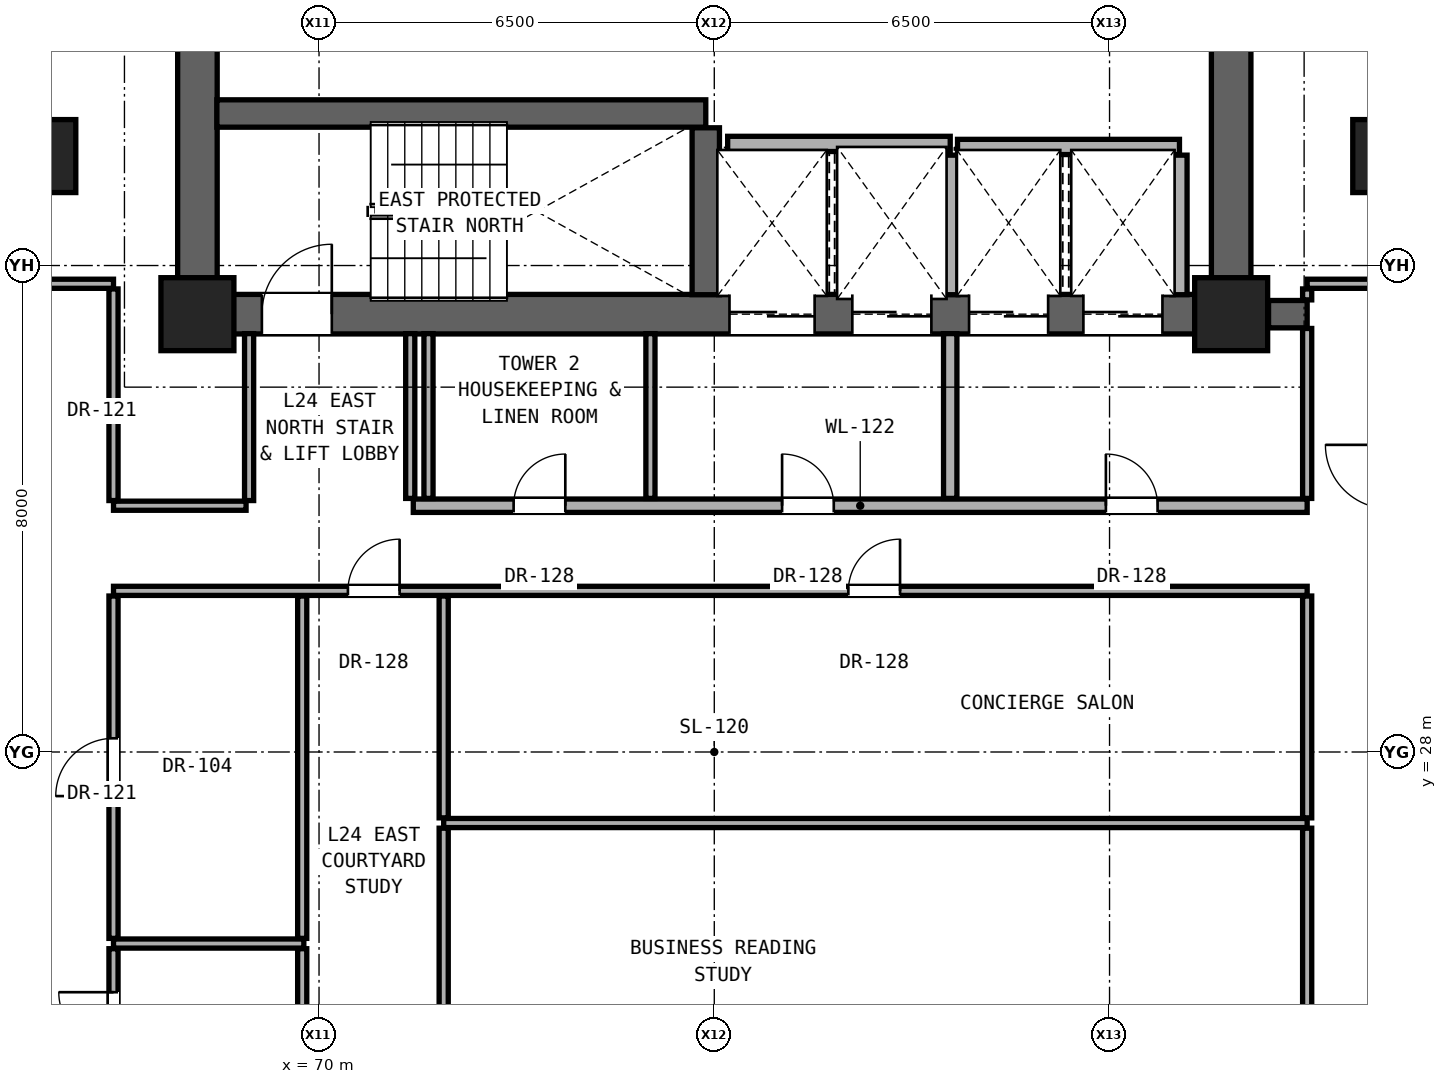
"""IFC4 building model, lengths in metres.
Left out: names, types, materials, properties, quantities, classifications, styles, units other than length and angle.
Written with IfcOpenShell. Run it as: python <this file> out.ifc"""

import sys

from ifc_helpers import new_model, si_unit, direction, frame, frame_2d, origin, origin_2d, place, context, subcontext, project, spatial, rectangle, extrude, element, fill, save


model = new_model("IFC4")
c1 = context("Model", 3, precision=1e-05, world=origin(), true_north=direction((0.0, 1.0)))
c2 = subcontext(c1, "Body", "Model", "MODEL_VIEW")
j1 = project(units=[si_unit("LENGTHUNIT", "METRE"), si_unit("PLANEANGLEUNIT", "RADIAN")], contexts=[c1])
p1 = place(None, origin())
s1 = spatial("IfcSite", under=j1, at=p1, CompositionType="ELEMENT")
p2 = place(p1, origin())
s2 = spatial("IfcBuilding", under=s1, at=p2, CompositionType="ELEMENT")
p3 = place(p2, frame((0.0, 0.0, 88.4)))
s3 = spatial("IfcBuildingStorey", under=s2, at=p3, CompositionType="ELEMENT", Elevation=88.4)
for number, where, z_axis, x_axis in (
    (1, (68.0, 35.2, 0.0), (0.0, 0.0, 1.0), (1.0, 0.0, 0.0)),
    (2, (85.0, 35.2, 0.0), (0.0, 0.0, 1.0), (1.0, 0.0, 0.0)),
):
    element("IfcColumn", number, at=place(p3, frame(where, z_axis=z_axis, x_axis=x_axis)), inside=s3, PredefinedType="COLUMN", context=c2, shape_type="SweptSolid", body=[
        extrude(rectangle(XDim=1.2, YDim=1.2, at=origin_2d()), origin(), (0.0, 0.0, 1.0), 3.3),
    ])
for number, where, z_axis, x_axis in (
    (3, (65.6, 37.8, 0.0), (0.0, 0.0, 1.0), (1.0, 0.0, 0.0)),
    (4, (87.4, 37.8, 0.0), (0.0, 0.0, 1.0), (1.0, 0.0, 0.0)),
):
    element("IfcColumn", number, at=place(p3, frame(where, z_axis=z_axis, x_axis=x_axis)), inside=s3, PredefinedType="PILASTER", context=c2, shape_type="SweptSolid", body=[
        extrude(rectangle(XDim=0.8, YDim=1.2, at=origin_2d()), origin(), (0.0, 0.0, 1.0), 3.3),
    ])
for number, where, z_axis, x_axis in (
    (5, (68.0, 35.2, 0.0), (0.0, 0.0, 1.0), (0.0, 1.0, 0.0)),
    (6, (85.0, 35.2, 0.0), (0.0, 0.0, 1.0), (0.0, 1.0, 0.0)),
):
    element("IfcWall", number, at=place(p3, frame(where, z_axis=z_axis, x_axis=x_axis)), inside=s3, PredefinedType="SHEAR", context=c2, shape_type="SweptSolid", body=[
        extrude(rectangle(XDim=5.6, YDim=0.65, at=frame_2d((2.8, 0.0))), origin(), (0.0, 0.0, 1.0), 3.08),
    ])
p4 = place(p3, frame((68.0, 35.2, 0.0), z_axis=(0.0, 0.0, 1.0), x_axis=(1.0, 0.0, 0.0)))
e7 = element("IfcWall", 7, at=p4, inside=s3, PredefinedType="SHEAR", context=c2, shape_type="SweptSolid", body=[
    extrude(rectangle(XDim=17.0, YDim=0.65, at=frame_2d((8.5, 0.0))), origin(), (0.0, 0.0, 1.0), 3.08),
])
p5 = place(p4, frame((1.06, 0.0, 0.0)))
e8 = element("IfcOpeningElement", 8, at=p5, cuts=e7, PredefinedType="OPENING", context=c2, shape_type="SweptSolid", body=[
    extrude(rectangle(XDim=1.15, YDim=2.2, at=frame_2d((0.575, 1.1))), frame((0.0, 0.335, 0.0), z_axis=(0.0, -1.0, 0.0), x_axis=(1.0, 0.0, 0.0)), (0.0, 0.0, 1.0), 0.67),
])
p6 = place(p4, frame((8.75, 0.0, 0.0)))
e9 = element("IfcOpeningElement", 9, at=p6, cuts=e7, PredefinedType="OPENING", context=c2, shape_type="SweptSolid", body=[
    extrude(rectangle(XDim=1.4, YDim=2.35, at=frame_2d((0.7, 1.175))), frame((0.0, 0.335, 0.0), z_axis=(0.0, -1.0, 0.0), x_axis=(1.0, 0.0, 0.0)), (0.0, 0.0, 1.0), 0.67),
])
p7 = place(p4, frame((10.77, 0.0, 0.0)))
e10 = element("IfcOpeningElement", 10, at=p7, cuts=e7, PredefinedType="OPENING", context=c2, shape_type="SweptSolid", body=[
    extrude(rectangle(XDim=1.3, YDim=2.3, at=frame_2d((0.65, 1.15))), frame((0.0, 0.335, 0.0), z_axis=(0.0, -1.0, 0.0), x_axis=(1.0, 0.0, 0.0)), (0.0, 0.0, 1.0), 0.67),
])
p8 = place(p4, frame((12.69, 0.0, 0.0)))
e11 = element("IfcOpeningElement", 11, at=p8, cuts=e7, PredefinedType="OPENING", context=c2, shape_type="SweptSolid", body=[
    extrude(rectangle(XDim=1.3, YDim=2.3, at=frame_2d((0.65, 1.15))), frame((0.0, 0.335, 0.0), z_axis=(0.0, -1.0, 0.0), x_axis=(1.0, 0.0, 0.0)), (0.0, 0.0, 1.0), 0.67),
])
p9 = place(p4, frame((14.57, 0.0, 0.0)))
e12 = element("IfcOpeningElement", 12, at=p9, cuts=e7, PredefinedType="OPENING", context=c2, shape_type="SweptSolid", body=[
    extrude(rectangle(XDim=1.3, YDim=2.3, at=frame_2d((0.65, 1.15))), frame((0.0, 0.335, 0.0), z_axis=(0.0, -1.0, 0.0), x_axis=(1.0, 0.0, 0.0)), (0.0, 0.0, 1.0), 0.67),
])
p10 = place(p3, frame((66.62, 24.85, 0.0), z_axis=(0.0, 0.0, 1.0), x_axis=(1.0, 0.0, 0.0)))
e13 = element("IfcWall", 13, at=p10, inside=s3, PredefinedType="PARTITIONING", context=c2, shape_type="SweptSolid", body=[
    extrude(rectangle(XDim=3.13, YDim=0.15, at=frame_2d((1.565, 0.0))), origin(), (0.0, 0.0, 1.0), 2.145),
])
p11 = place(p3, frame((72.05, 26.832, 0.0), z_axis=(0.0, 0.0, 1.0), x_axis=(1.0, 0.0, 0.0)))
e14 = element("IfcWall", 14, at=p11, inside=s3, PredefinedType="PARTITIONING", context=c2, shape_type="SweptSolid", body=[
    extrude(rectangle(XDim=14.2, YDim=0.15, at=frame_2d((7.1, 0.0))), origin(), (0.0, 0.0, 1.0), 2.145),
])
p12 = place(p3, frame((66.62, 30.65, 0.0), z_axis=(0.0, 0.0, 1.0), x_axis=(1.0, 0.0, 0.0)))
e15 = element("IfcWall", 15, at=p12, inside=s3, PredefinedType="PARTITIONING", context=c2, shape_type="SweptSolid", body=[
    extrude(rectangle(XDim=19.63, YDim=0.15, at=frame_2d((9.815, 0.0))), origin(), (0.0, 0.0, 1.0), 2.145),
])
p13 = place(p12, frame((3.855, 0.0, 0.0)))
e16 = element("IfcOpeningElement", 16, at=p13, cuts=e15, PredefinedType="OPENING", context=c2, shape_type="SweptSolid", body=[
    extrude(rectangle(XDim=0.85, YDim=2.01, at=frame_2d((0.425, 1.005))), frame((0.0, 0.085, 0.0), z_axis=(0.0, -1.0, 0.0), x_axis=(1.0, 0.0, 0.0)), (0.0, 0.0, 1.0), 0.17),
])
p14 = place(p12, frame((12.085, 0.0, 0.0)))
e17 = element("IfcOpeningElement", 17, at=p14, cuts=e15, PredefinedType="OPENING", context=c2, shape_type="SweptSolid", body=[
    extrude(rectangle(XDim=0.85, YDim=2.01, at=frame_2d((0.425, 1.005))), frame((0.0, 0.085, 0.0), z_axis=(0.0, -1.0, 0.0), x_axis=(1.0, 0.0, 0.0)), (0.0, 0.0, 1.0), 0.17),
])
p15 = place(p3, frame((66.62, 32.05, 0.0), z_axis=(0.0, 0.0, 1.0), x_axis=(1.0, 0.0, 0.0)))
e18 = element("IfcWall", 18, at=p15, inside=s3, PredefinedType="PARTITIONING", context=c2, shape_type="SweptSolid", body=[
    extrude(rectangle(XDim=2.18, YDim=0.15, at=frame_2d((1.09, 0.0))), origin(), (0.0, 0.0, 1.0), 2.145),
])
p16 = place(p3, frame((71.55, 32.05, 0.0), z_axis=(0.0, 0.0, 1.0), x_axis=(1.0, 0.0, 0.0)))
e19 = element("IfcWall", 19, at=p16, inside=s3, PredefinedType="SOLIDWALL", context=c2, shape_type="SweptSolid", body=[
    extrude(rectangle(XDim=14.7, YDim=0.22, at=frame_2d((7.35, 0.0))), origin(), (0.0, 0.0, 1.0), 2.145),
])
p17 = place(p16, frame((11.39, 0.0, 0.0)))
e20 = element("IfcOpeningElement", 20, at=p17, cuts=e19, PredefinedType="OPENING", context=c2, shape_type="SweptSolid", body=[
    extrude(rectangle(XDim=0.85, YDim=2.01, at=frame_2d((0.425, 1.005))), frame((0.0, 0.12, 0.0), z_axis=(0.0, -1.0, 0.0), x_axis=(1.0, 0.0, 0.0)), (0.0, 0.0, 1.0), 0.24),
])
p18 = place(p16, frame((6.065, 0.0, 0.0)))
e21 = element("IfcOpeningElement", 21, at=p18, cuts=e19, PredefinedType="OPENING", context=c2, shape_type="SweptSolid", body=[
    extrude(rectangle(XDim=0.85, YDim=2.01, at=frame_2d((0.425, 1.005))), frame((0.0, 0.12, 0.0), z_axis=(0.0, -1.0, 0.0), x_axis=(1.0, 0.0, 0.0)), (0.0, 0.0, 1.0), 0.24),
])
p19 = place(p16, frame((1.65, 0.0, 0.0)))
e22 = element("IfcOpeningElement", 22, at=p19, cuts=e19, PredefinedType="OPENING", context=c2, shape_type="SweptSolid", body=[
    extrude(rectangle(XDim=0.85, YDim=2.01, at=frame_2d((0.425, 1.005))), frame((0.0, 0.12, 0.0), z_axis=(0.0, -1.0, 0.0), x_axis=(1.0, 0.0, 0.0)), (0.0, 0.0, 1.0), 0.24),
])
p20 = place(p3, frame((85.615, 35.2, 0.0), z_axis=(0.0, 0.0, 1.0), x_axis=(1.0, 0.0, 0.0)))
e23 = element("IfcWall", 23, at=p20, inside=s3, PredefinedType="SHEAR", context=c2, shape_type="SweptSolid", body=[
    extrude(rectangle(XDim=0.635, YDim=0.45, at=frame_2d((0.317, 0.0))), origin(), (0.0, 0.0, 1.0), 3.08),
])
p21 = place(p3, frame((65.25, 35.7, 0.0), z_axis=(0.0, 0.0, 1.0), x_axis=(1.0, 0.0, 0.0)))
e24 = element("IfcWall", 24, at=p21, inside=s3, PredefinedType="PARTITIONING", context=c2, shape_type="SweptSolid", body=[
    extrude(rectangle(XDim=1.37, YDim=0.15, at=frame_2d((0.685, 0.0))), origin(), (0.0, 0.0, 1.0), 3.08),
])
p22 = place(p3, frame((86.25, 35.7, 0.0), z_axis=(0.0, 0.0, 1.0), x_axis=(1.0, 0.0, 0.0)))
e25 = element("IfcWall", 25, at=p22, inside=s3, PredefinedType="PARTITIONING", context=c2, shape_type="SweptSolid", body=[
    extrude(rectangle(XDim=1.35, YDim=0.15, at=frame_2d((0.675, 0.0))), origin(), (0.0, 0.0, 1.0), 3.08),
])
p23 = place(p3, frame((80.5, 37.95, 0.0), z_axis=(0.0, 0.0, 1.0), x_axis=(1.0, 0.0, 0.0)))
e26 = element("IfcWall", 26, at=p23, inside=s3, PredefinedType="SOLIDWALL", context=c2, shape_type="SweptSolid", body=[
    extrude(rectangle(XDim=3.65, YDim=0.25, at=frame_2d((1.825, 0.0))), origin(), (0.0, 0.0, 1.0), 3.08),
])
p24 = place(p3, frame((76.72, 38.0, 0.0), z_axis=(0.0, 0.0, 1.0), x_axis=(1.0, 0.0, 0.0)))
e27 = element("IfcWall", 27, at=p24, inside=s3, PredefinedType="SOLIDWALL", context=c2, shape_type="SweptSolid", body=[
    extrude(rectangle(XDim=3.66, YDim=0.25, at=frame_2d((1.83, 0.0))), origin(), (0.0, 0.0, 1.0), 3.08),
])
p25 = place(p3, frame((68.32, 38.5, 0.0), z_axis=(0.0, 0.0, 1.0), x_axis=(1.0, 0.0, 0.0)))
e28 = element("IfcWall", 28, at=p25, inside=s3, PredefinedType="SHEAR", context=c2, shape_type="SweptSolid", body=[
    extrude(rectangle(XDim=8.04, YDim=0.45, at=frame_2d((4.02, 0.0))), origin(), (0.0, 0.0, 1.0), 3.08),
])
p26 = place(p3, frame((66.62, 22.435, 0.0), z_axis=(0.0, 0.0, 1.0), x_axis=(0.0, 1.0, 0.0)))
e29 = element("IfcWall", 29, at=p26, inside=s3, PredefinedType="PARTITIONING", context=c2, shape_type="SweptSolid", body=[
    extrude(rectangle(XDim=2.33, YDim=0.15, at=frame_2d((1.165, 0.0))), origin(), (0.0, 0.0, 1.0), 3.08),
])
p27 = place(p26, frame((0.715, 0.0, 0.0)))
e30 = element("IfcOpeningElement", 30, at=p27, cuts=e29, PredefinedType="OPENING", context=c2, shape_type="SweptSolid", body=[
    extrude(rectangle(XDim=0.9, YDim=2.1, at=frame_2d((0.45, 1.05))), frame((0.0, 0.085, 0.0), z_axis=(0.0, -1.0, 0.0), x_axis=(1.0, 0.0, 0.0)), (0.0, 0.0, 1.0), 0.17),
])
p28 = place(p3, frame((66.62, 24.935, 0.0), z_axis=(0.0, 0.0, 1.0), x_axis=(0.0, 1.0, 0.0)))
e31 = element("IfcWall", 31, at=p28, inside=s3, PredefinedType="PARTITIONING", context=c2, shape_type="SweptSolid", body=[
    extrude(rectangle(XDim=5.63, YDim=0.15, at=frame_2d((2.815, 0.0))), origin(), (0.0, 0.0, 1.0), 2.299),
])
p29 = place(p28, frame((2.34, 0.0, 0.0)))
e32 = element("IfcOpeningElement", 32, at=p29, cuts=e31, PredefinedType="OPENING", context=c2, shape_type="SweptSolid", body=[
    extrude(rectangle(XDim=0.95, YDim=2.15, at=frame_2d((0.475, 1.075))), frame((0.0, 0.085, 0.0), z_axis=(0.0, -1.0, 0.0), x_axis=(1.0, 0.0, 0.0)), (0.0, 0.0, 1.0), 0.17),
])
p30 = place(p3, frame((66.62, 32.135, 0.0), z_axis=(0.0, 0.0, 1.0), x_axis=(0.0, 1.0, 0.0)))
e33 = element("IfcWall", 33, at=p30, inside=s3, PredefinedType="PARTITIONING", context=c2, shape_type="SweptSolid", body=[
    extrude(rectangle(XDim=3.48, YDim=0.15, at=frame_2d((1.74, 0.0))), origin(), (0.0, 0.0, 1.0), 2.472),
])
p31 = place(p3, frame((68.85, 32.135, 0.0), z_axis=(0.0, 0.0, 1.0), x_axis=(0.0, 1.0, 0.0)))
e34 = element("IfcWall", 34, at=p31, inside=s3, PredefinedType="PARTITIONING", context=c2, shape_type="SweptSolid", body=[
    extrude(rectangle(XDim=2.745, YDim=0.15, at=frame_2d((1.373, 0.0))), origin(), (0.0, 0.0, 1.0), 3.08),
])
p32 = place(p3, frame((69.723, 22.435, 0.0), z_axis=(0.0, 0.0, 1.0), x_axis=(0.0, 1.0, 0.0)))
e35 = element("IfcWall", 35, at=p32, inside=s3, PredefinedType="PARTITIONING", context=c2, shape_type="SweptSolid", body=[
    extrude(rectangle(XDim=2.33, YDim=0.15, at=frame_2d((1.165, 0.0))), origin(), (0.0, 0.0, 1.0), 3.08),
])
p33 = place(p3, frame((69.723, 24.935, 0.0), z_axis=(0.0, 0.0, 1.0), x_axis=(0.0, 1.0, 0.0)))
e36 = element("IfcWall", 36, at=p33, inside=s3, PredefinedType="PARTITIONING", context=c2, shape_type="SweptSolid", body=[
    extrude(rectangle(XDim=5.63, YDim=0.15, at=frame_2d((2.815, 0.0))), origin(), (0.0, 0.0, 1.0), 2.145),
])
for number, where, z_axis, x_axis in (
    (37, (71.5, 32.17, 0.0), (0.0, 0.0, 1.0), (0.0, 1.0, 0.0)),
    (38, (71.8, 32.17, 0.0), (0.0, 0.0, 1.0), (0.0, 1.0, 0.0)),
):
    element("IfcWall", number, at=place(p3, frame(where, z_axis=z_axis, x_axis=x_axis)), inside=s3, PredefinedType="PARTITIONING", context=c2, shape_type="SweptSolid", body=[
        extrude(rectangle(XDim=2.71, YDim=0.15, at=frame_2d((1.355, 0.0))), origin(), (0.0, 0.0, 1.0), 3.08),
    ])
p34 = place(p3, frame((72.05, 22.435, 0.0), z_axis=(0.0, 0.0, 1.0), x_axis=(0.0, 1.0, 0.0)))
e39 = element("IfcWall", 39, at=p34, inside=s3, PredefinedType="PARTITIONING", context=c2, shape_type="SweptSolid", body=[
    extrude(rectangle(XDim=4.312, YDim=0.15, at=frame_2d((2.156, 0.0))), origin(), (0.0, 0.0, 1.0), 2.609),
])
p35 = place(p3, frame((72.05, 26.917, 0.0), z_axis=(0.0, 0.0, 1.0), x_axis=(0.0, 1.0, 0.0)))
e40 = element("IfcWall", 40, at=p35, inside=s3, PredefinedType="PARTITIONING", context=c2, shape_type="SweptSolid", body=[
    extrude(rectangle(XDim=3.648, YDim=0.15, at=frame_2d((1.824, 0.0))), origin(), (0.0, 0.0, 1.0), 2.145),
])
p36 = place(p3, frame((75.45, 32.17, 0.0), z_axis=(0.0, 0.0, 1.0), x_axis=(0.0, 1.0, 0.0)))
e41 = element("IfcWall", 41, at=p36, inside=s3, PredefinedType="PARTITIONING", context=c2, shape_type="SweptSolid", body=[
    extrude(rectangle(XDim=2.71, YDim=0.15, at=frame_2d((1.355, 0.0))), origin(), (0.0, 0.0, 1.0), 3.08),
])
p37 = place(p3, frame((76.36, 35.52, 0.0), z_axis=(0.0, 0.0, 1.0), x_axis=(0.0, 1.0, 0.0)))
e42 = element("IfcWall", 42, at=p37, inside=s3, PredefinedType="SHEAR", context=c2, shape_type="SweptSolid", body=[
    extrude(rectangle(XDim=2.745, YDim=0.45, at=frame_2d((1.373, 0.0))), origin(), (0.0, 0.0, 1.0), 3.08),
])
p38 = place(p3, frame((80.38, 32.17, 0.0), z_axis=(0.0, 0.0, 1.0), x_axis=(0.0, 1.0, 0.0)))
e43 = element("IfcWall", 43, at=p38, inside=s3, PredefinedType="SOLIDWALL", context=c2, shape_type="SweptSolid", body=[
    extrude(rectangle(XDim=2.71, YDim=0.22, at=frame_2d((1.355, 0.0))), origin(), (0.0, 0.0, 1.0), 3.08),
])
for number, where, z_axis, x_axis in (
    (44, (80.38, 35.52, 0.0), (0.0, 0.0, 1.0), (0.0, 1.0, 0.0)),
    (45, (84.15, 35.52, 0.0), (0.0, 0.0, 1.0), (0.0, 1.0, 0.0)),
):
    element("IfcWall", number, at=place(p3, frame(where, z_axis=z_axis, x_axis=x_axis)), inside=s3, PredefinedType="SOLIDWALL", context=c2, shape_type="SweptSolid", body=[
        extrude(rectangle(XDim=2.295, YDim=0.25, at=frame_2d((1.147, 0.0))), origin(), (0.0, 0.0, 1.0), 3.08),
    ])
p39 = place(p3, frame((86.25, 22.435, 0.0), z_axis=(0.0, 0.0, 1.0), x_axis=(0.0, 1.0, 0.0)))
e46 = element("IfcWall", 46, at=p39, inside=s3, PredefinedType="PARTITIONING", context=c2, shape_type="SweptSolid", body=[
    extrude(rectangle(XDim=4.312, YDim=0.15, at=frame_2d((2.156, 0.0))), origin(), (0.0, 0.0, 1.0), 3.08),
])
p40 = place(p3, frame((86.25, 26.917, 0.0), z_axis=(0.0, 0.0, 1.0), x_axis=(0.0, 1.0, 0.0)))
e47 = element("IfcWall", 47, at=p40, inside=s3, PredefinedType="PARTITIONING", context=c2, shape_type="SweptSolid", body=[
    extrude(rectangle(XDim=3.648, YDim=0.15, at=frame_2d((1.824, 0.0))), origin(), (0.0, 0.0, 1.0), 2.299),
])
p41 = place(p3, frame((86.25, 32.17, 0.0), z_axis=(0.0, 0.0, 1.0), x_axis=(0.0, 1.0, 0.0)))
e48 = element("IfcWall", 48, at=p41, inside=s3, PredefinedType="PARTITIONING", context=c2, shape_type="SweptSolid", body=[
    extrude(rectangle(XDim=2.795, YDim=0.15, at=frame_2d((1.397, 0.0))), origin(), (0.0, 0.0, 1.0), 2.472),
])
p42 = place(p3, frame((86.25, 35.435, 0.0), z_axis=(0.0, 0.0, 1.0), x_axis=(0.0, 1.0, 0.0)))
e49 = element("IfcWall", 49, at=p42, inside=s3, PredefinedType="PARTITIONING", context=c2, shape_type="SweptSolid", body=[
    extrude(rectangle(XDim=0.18, YDim=0.15, at=frame_2d((0.09, 0.0))), origin(), (0.0, 0.0, 1.0), 2.472),
])
p43 = place(p17, origin())
e50 = element("IfcDoor", 50, at=p43, inside=s3, OperationType="SINGLE_SWING_LEFT", PredefinedType="DOOR", context=c2, shape_type="SweptSolid", body=[
    extrude(rectangle(XDim=0.85, YDim=2.01, at=frame_2d((0.425, 1.005))), frame((0.0, 0.025, 0.0), z_axis=(0.0, -1.0, 0.0), x_axis=(1.0, 0.0, 0.0)), (0.0, 0.0, 1.0), 0.05),
])
fill(e20, e50)
p44 = place(p5, origin())
e51 = element("IfcDoor", 51, at=p44, inside=s3, OperationType="SINGLE_SWING_RIGHT", PredefinedType="DOOR", context=c2, shape_type="SweptSolid", body=[
    extrude(rectangle(XDim=1.15, YDim=2.2, at=frame_2d((0.575, 1.1))), frame((0.0, 0.025, 0.0), z_axis=(0.0, -1.0, 0.0), x_axis=(1.0, 0.0, 0.0)), (0.0, 0.0, 1.0), 0.05),
])
fill(e8, e51)
p45 = place(p18, origin())
e52 = element("IfcDoor", 52, at=p45, inside=s3, OperationType="SINGLE_SWING_LEFT", PredefinedType="DOOR", context=c2, shape_type="SweptSolid", body=[
    extrude(rectangle(XDim=0.85, YDim=2.01, at=frame_2d((0.425, 1.005))), frame((0.0, 0.025, 0.0), z_axis=(0.0, -1.0, 0.0), x_axis=(1.0, 0.0, 0.0)), (0.0, 0.0, 1.0), 0.05),
])
fill(e21, e52)
p46 = place(p19, origin())
e53 = element("IfcDoor", 53, at=p46, inside=s3, OperationType="SINGLE_SWING_RIGHT", PredefinedType="DOOR", context=c2, shape_type="SweptSolid", body=[
    extrude(rectangle(XDim=0.85, YDim=2.01, at=frame_2d((0.425, 1.005))), frame((0.0, 0.025, 0.0), z_axis=(0.0, -1.0, 0.0), x_axis=(1.0, 0.0, 0.0)), (0.0, 0.0, 1.0), 0.05),
])
fill(e22, e53)
p47 = place(p27, origin())
e54 = element("IfcDoor", 54, at=p47, inside=s3, OperationType="SINGLE_SWING_RIGHT", PredefinedType="DOOR", context=c2, shape_type="SweptSolid", body=[
    extrude(rectangle(XDim=0.9, YDim=2.1, at=frame_2d((0.45, 1.05))), frame((0.0, 0.025, 0.0), z_axis=(0.0, -1.0, 0.0), x_axis=(1.0, 0.0, 0.0)), (0.0, 0.0, 1.0), 0.05),
])
fill(e30, e54)
p48 = place(p29, origin())
e55 = element("IfcDoor", 55, at=p48, inside=s3, OperationType="SINGLE_SWING_LEFT", PredefinedType="DOOR", context=c2, shape_type="SweptSolid", body=[
    extrude(rectangle(XDim=0.95, YDim=2.15, at=frame_2d((0.475, 1.075))), frame((0.0, 0.025, 0.0), z_axis=(0.0, -1.0, 0.0), x_axis=(1.0, 0.0, 0.0)), (0.0, 0.0, 1.0), 0.05),
])
fill(e32, e55)
p49 = place(p13, origin())
e56 = element("IfcDoor", 56, at=p49, inside=s3, OperationType="SINGLE_SWING_RIGHT", PredefinedType="DOOR", context=c2, shape_type="SweptSolid", body=[
    extrude(rectangle(XDim=0.85, YDim=2.01, at=frame_2d((0.425, 1.005))), frame((0.0, 0.025, 0.0), z_axis=(0.0, -1.0, 0.0), x_axis=(1.0, 0.0, 0.0)), (0.0, 0.0, 1.0), 0.05),
])
fill(e16, e56)
p50 = place(p14, origin())
e57 = element("IfcDoor", 57, at=p50, inside=s3, OperationType="SINGLE_SWING_RIGHT", PredefinedType="DOOR", context=c2, shape_type="SweptSolid", body=[
    extrude(rectangle(XDim=0.85, YDim=2.01, at=frame_2d((0.425, 1.005))), frame((0.0, 0.025, 0.0), z_axis=(0.0, -1.0, 0.0), x_axis=(1.0, 0.0, 0.0)), (0.0, 0.0, 1.0), 0.05),
])
fill(e17, e57)
p51 = place(p6, origin())
e58 = element("IfcDoor", 58, at=p51, inside=s3, OperationType="DOUBLE_DOOR_SLIDING", PredefinedType="DOOR", context=c2, shape_type="SweptSolid", body=[
    extrude(rectangle(XDim=1.4, YDim=2.35, at=frame_2d((0.7, 1.175))), frame((0.0, 0.025, 0.0), z_axis=(0.0, -1.0, 0.0), x_axis=(1.0, 0.0, 0.0)), (0.0, 0.0, 1.0), 0.05),
])
fill(e9, e58)
p52 = place(p7, origin())
e59 = element("IfcDoor", 59, at=p52, inside=s3, OperationType="DOUBLE_DOOR_SLIDING", PredefinedType="DOOR", context=c2, shape_type="SweptSolid", body=[
    extrude(rectangle(XDim=1.3, YDim=2.3, at=frame_2d((0.65, 1.15))), frame((0.0, 0.025, 0.0), z_axis=(0.0, -1.0, 0.0), x_axis=(1.0, 0.0, 0.0)), (0.0, 0.0, 1.0), 0.05),
])
fill(e10, e59)
p53 = place(p8, origin())
e60 = element("IfcDoor", 60, at=p53, inside=s3, OperationType="DOUBLE_DOOR_SLIDING", PredefinedType="DOOR", context=c2, shape_type="SweptSolid", body=[
    extrude(rectangle(XDim=1.3, YDim=2.3, at=frame_2d((0.65, 1.15))), frame((0.0, 0.025, 0.0), z_axis=(0.0, -1.0, 0.0), x_axis=(1.0, 0.0, 0.0)), (0.0, 0.0, 1.0), 0.05),
])
fill(e11, e60)
p54 = place(p9, origin())
e61 = element("IfcDoor", 61, at=p54, inside=s3, OperationType="DOUBLE_DOOR_SLIDING", PredefinedType="DOOR", context=c2, shape_type="SweptSolid", body=[
    extrude(rectangle(XDim=1.3, YDim=2.3, at=frame_2d((0.65, 1.15))), frame((0.0, 0.025, 0.0), z_axis=(0.0, -1.0, 0.0), x_axis=(1.0, 0.0, 0.0)), (0.0, 0.0, 1.0), 0.05),
])
fill(e12, e61)
save(model, sys.argv[1])
